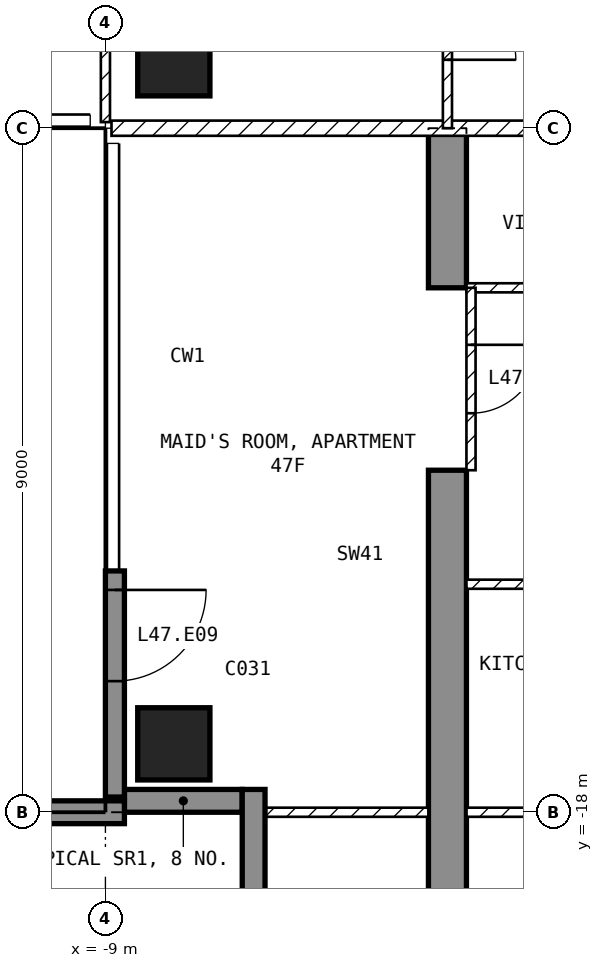
"""IFC4 building model, lengths in metres.
Left out: names, types, materials, properties, quantities, classifications, styles, units other than length and angle.
Written with IfcOpenShell. Run it as: python <this file> out.ifc"""

import sys

from ifc_helpers import new_model, si_unit, direction, frame, frame_2d, origin, origin_2d, place, context, subcontext, project, spatial, polyline, rectangle, outline, extrude, element, fill, save


model = new_model("IFC4")
c1 = context("Model", 3, precision=1e-05, world=origin(), true_north=direction((0.0, 1.0)))
c2 = subcontext(c1, "Body", "Model", "MODEL_VIEW")
j1 = project(units=[si_unit("LENGTHUNIT", "METRE"), si_unit("PLANEANGLEUNIT", "RADIAN")], contexts=[c1])
p1 = place(None, origin())
s1 = spatial("IfcSite", under=j1, at=p1, CompositionType="ELEMENT")
p2 = place(p1, origin())
s2 = spatial("IfcBuilding", under=s1, at=p2, CompositionType="ELEMENT")
p3 = place(p2, frame((0.0, 0.0, 191.1)))
s3 = spatial("IfcBuildingStorey", under=s2, at=p3, CompositionType="ELEMENT", Elevation=191.1)
for number, where, z_axis, x_axis in (
    (1, (-8.1, -17.1, -0.25), (0.0, 0.0, 1.0), (1.0, 0.0, 0.0)),
    (2, (-8.1, -8.1, -0.25), (0.0, 0.0, 1.0), (1.0, 0.0, 0.0)),
):
    element("IfcColumn", number, at=place(p3, frame(where, z_axis=z_axis, x_axis=x_axis)), inside=s3, PredefinedType="COLUMN", context=c2, shape_type="SweptSolid", body=[
        extrude(rectangle(XDim=0.95, YDim=0.95, at=origin_2d()), origin(), (0.0, 0.0, 1.0), 3.5),
    ])
p4 = place(p3, frame((-4.75, -20.225, -0.25), z_axis=(1.0, 0.0, 0.0), x_axis=(0.0, 1.0, 0.0)))
e3 = element("IfcWall", 3, at=p4, inside=s3, PredefinedType="SHEAR", context=c2, shape_type="SweptSolid", body=[
    extrude(outline(polyline([(0.0, 0.0), (6.725, 0.0), (6.725, 2.65), (9.125, 2.65), (9.125, 0.0), (11.225, 0.0), (11.225, 3.5), (0.0, 3.5), (0.0, 0.0)])), origin(), (0.0, 0.0, 1.0), 0.5),
])
p5 = place(p3, frame((-8.875, -14.825, 0.0), z_axis=(0.0, 0.0, 1.0), x_axis=(0.0, -1.0, 0.0)))
e4 = element("IfcWall", 4, at=p5, inside=s3, PredefinedType="SOLIDWALL", context=c2, shape_type="SweptSolid", body=[
    extrude(rectangle(XDim=2.975, YDim=0.25, at=frame_2d((1.488, 0.0))), origin(), (0.0, 0.0, 1.0), 3.25),
])
p6 = place(p5, frame((0.25, 0.0, 0.0)))
e5 = element("IfcOpeningElement", 5, at=p6, cuts=e4, PredefinedType="OPENING", context=c2, shape_type="SweptSolid", body=[
    extrude(rectangle(XDim=1.2, YDim=2.4, at=frame_2d((0.6, 1.2))), frame((0.0, 0.135, 0.0), z_axis=(0.0, -1.0, 0.0), x_axis=(1.0, 0.0, 0.0)), (0.0, 0.0, 1.0), 0.27),
])
p7 = place(p3, frame((-8.75, -17.85, 0.0), z_axis=(0.0, 0.0, 1.0), x_axis=(1.0, 0.0, 0.0)))
e6 = element("IfcWall", 6, at=p7, inside=s3, PredefinedType="SOLIDWALL", context=c2, shape_type="SweptSolid", body=[
    extrude(rectangle(XDim=1.55, YDim=0.3, at=frame_2d((0.775, 0.0))), origin(), (0.0, 0.0, 1.0), 3.25),
])
p8 = place(p3, frame((-7.05, -17.7, 0.0), z_axis=(0.0, 0.0, 1.0), x_axis=(0.0, -1.0, 0.0)))
e7 = element("IfcWall", 7, at=p8, inside=s3, PredefinedType="SOLIDWALL", context=c2, shape_type="SweptSolid", body=[
    extrude(rectangle(XDim=1.8, YDim=0.3, at=frame_2d((0.9, 0.0))), origin(), (0.0, 0.0, 1.0), 3.25),
])
p9 = place(p3, frame((-8.75, -18.0, 0.0), z_axis=(0.0, 0.0, 1.0), x_axis=(-1.0, 0.0, 0.0)))
e8 = element("IfcWall", 8, at=p9, inside=s3, PredefinedType="SOLIDWALL", context=c2, shape_type="SweptSolid", body=[
    extrude(rectangle(XDim=2.95, YDim=0.3, at=frame_2d((1.475, 0.0))), origin(), (0.0, 0.0, 1.0), 3.25),
])
p10 = place(p3, frame((8.92, -9.0, 0.0), z_axis=(0.0, 0.0, 1.0), x_axis=(-1.0, 0.0, 0.0)))
e9 = element("IfcWall", 9, at=p10, inside=s3, PredefinedType="PARTITIONING", context=c2, shape_type="SweptSolid", body=[
    extrude(rectangle(XDim=17.84, YDim=0.2, at=frame_2d((8.92, 0.0))), origin(), (0.0, 0.0, 1.0), 3.25),
])
p11 = place(p10, frame((8.42, 0.0, 0.0)))
e10 = element("IfcOpeningElement", 10, at=p11, cuts=e9, PredefinedType="OPENING", context=c2, shape_type="SweptSolid", body=[
    extrude(rectangle(XDim=1.0, YDim=2.1, at=frame_2d((0.5, 1.05))), frame((0.0, 0.11, 0.0), z_axis=(0.0, -1.0, 0.0), x_axis=(1.0, 0.0, 0.0)), (0.0, 0.0, 1.0), 0.22),
])
p12 = place(p3, frame((-9.0, -1.3, 0.0), z_axis=(0.0, 0.0, 1.0), x_axis=(0.0, -1.0, 0.0)))
e11 = element("IfcWall", 11, at=p12, inside=s3, PredefinedType="PARTITIONING", context=c2, shape_type="SweptSolid", body=[
    extrude(rectangle(XDim=7.62, YDim=0.12, at=frame_2d((3.81, 0.0))), origin(), (0.0, 0.0, 1.0), 3.25),
])
p13 = place(p12, frame((1.15, 0.0, 0.0)))
e12 = element("IfcOpeningElement", 12, at=p13, cuts=e11, PredefinedType="OPENING", context=c2, shape_type="SweptSolid", body=[
    extrude(rectangle(XDim=0.9, YDim=2.1, at=frame_2d((0.45, 1.05))), frame((0.0, 0.07, 0.0), z_axis=(0.0, -1.0, 0.0), x_axis=(1.0, 0.0, 0.0)), (0.0, 0.0, 1.0), 0.14),
])
p14 = place(p3, frame((-4.5, -6.3, 0.0), z_axis=(0.0, 0.0, 1.0), x_axis=(0.0, -1.0, 0.0)))
e13 = element("IfcWall", 13, at=p14, inside=s3, PredefinedType="PARTITIONING", context=c2, shape_type="SweptSolid", body=[
    extrude(rectangle(XDim=2.7, YDim=0.12, at=frame_2d((1.35, 0.0))), origin(), (0.0, 0.0, 1.0), 3.25),
])
p15 = place(p14, frame((0.9, 0.0, 0.0)))
e14 = element("IfcOpeningElement", 14, at=p15, cuts=e13, PredefinedType="OPENING", context=c2, shape_type="SweptSolid", body=[
    extrude(rectangle(XDim=0.9, YDim=2.1, at=frame_2d((0.45, 1.05))), frame((0.0, 0.07, 0.0), z_axis=(0.0, -1.0, 0.0), x_axis=(1.0, 0.0, 0.0)), (0.0, 0.0, 1.0), 0.14),
])
p16 = place(p3, frame((2.1, -11.1, 0.0), z_axis=(0.0, 0.0, 1.0), x_axis=(-1.0, 0.0, 0.0)))
e15 = element("IfcWall", 15, at=p16, inside=s3, PredefinedType="PARTITIONING", context=c2, shape_type="SweptSolid", body=[
    extrude(rectangle(XDim=6.35, YDim=0.12, at=frame_2d((3.175, 0.0))), origin(), (0.0, 0.0, 1.0), 3.25),
])
p17 = place(p16, frame((2.725, 0.0, 0.0)))
e16 = element("IfcOpeningElement", 16, at=p17, cuts=e15, PredefinedType="OPENING", context=c2, shape_type="SweptSolid", body=[
    extrude(rectangle(XDim=0.9, YDim=2.1, at=frame_2d((0.45, 1.05))), frame((0.0, 0.07, 0.0), z_axis=(0.0, -1.0, 0.0), x_axis=(1.0, 0.0, 0.0)), (0.0, 0.0, 1.0), 0.14),
])
p18 = place(p3, frame((-0.44, -15.0, 0.0), z_axis=(0.0, 0.0, 1.0), x_axis=(-1.0, 0.0, 0.0)))
e17 = element("IfcWall", 17, at=p18, inside=s3, PredefinedType="PARTITIONING", context=c2, shape_type="SweptSolid", body=[
    extrude(rectangle(XDim=3.81, YDim=0.12, at=frame_2d((1.905, 0.0))), origin(), (0.0, 0.0, 1.0), 3.25),
])
p19 = place(p3, frame((4.25, -18.0, 0.0), z_axis=(0.0, 0.0, 1.0), x_axis=(-1.0, 0.0, 0.0)))
e18 = element("IfcWall", 18, at=p19, inside=s3, PredefinedType="PARTITIONING", context=c2, shape_type="SweptSolid", body=[
    extrude(rectangle(XDim=8.5, YDim=0.12, at=frame_2d((4.25, 0.0))), origin(), (0.0, 0.0, 1.0), 3.25),
])
p20 = place(p19, frame((1.925, 0.0, 0.0)))
e19 = element("IfcOpeningElement", 19, at=p20, cuts=e18, PredefinedType="OPENING", context=c2, shape_type="SweptSolid", body=[
    extrude(rectangle(XDim=0.9, YDim=2.1, at=frame_2d((0.45, 1.05))), frame((0.0, 0.07, 0.0), z_axis=(0.0, -1.0, 0.0), x_axis=(1.0, 0.0, 0.0)), (0.0, 0.0, 1.0), 0.14),
])
p21 = place(p3, frame((-4.75, -18.0, 0.0), z_axis=(0.0, 0.0, 1.0), x_axis=(-1.0, 0.0, 0.0)))
e20 = element("IfcWall", 20, at=p21, inside=s3, PredefinedType="PARTITIONING", context=c2, shape_type="SweptSolid", body=[
    extrude(rectangle(XDim=2.37, YDim=0.12, at=frame_2d((1.185, 0.0))), origin(), (0.0, 0.0, 1.0), 3.25),
])
p22 = place(p3, frame((-4.19, -11.1, 0.0), z_axis=(0.0, 0.0, 1.0), x_axis=(0.0, -1.0, 0.0)))
e21 = element("IfcWall", 21, at=p22, inside=s3, PredefinedType="PARTITIONING", context=c2, shape_type="SweptSolid", body=[
    extrude(rectangle(XDim=2.4, YDim=0.12, at=frame_2d((1.2, 0.0))), origin(), (0.0, 0.0, 1.0), 2.4),
])
p23 = place(p22, frame((0.75, 0.0, 0.0)))
e22 = element("IfcOpeningElement", 22, at=p23, cuts=e21, PredefinedType="OPENING", context=c2, shape_type="SweptSolid", body=[
    extrude(rectangle(XDim=0.9, YDim=2.1, at=frame_2d((0.45, 1.05))), frame((0.0, 0.07, 0.0), z_axis=(0.0, -1.0, 0.0), x_axis=(1.0, 0.0, 0.0)), (0.0, 0.0, 1.0), 0.14),
])
p24 = place(p6, origin())
e23 = element("IfcDoor", 23, at=p24, inside=s3, OperationType="SINGLE_SWING_LEFT", PredefinedType="DOOR", context=c2, shape_type="SweptSolid", body=[
    extrude(rectangle(XDim=1.2, YDim=2.4, at=frame_2d((0.6, 1.2))), frame((0.0, 0.025, 0.0), z_axis=(0.0, -1.0, 0.0), x_axis=(1.0, 0.0, 0.0)), (0.0, 0.0, 1.0), 0.05),
])
fill(e5, e23)
p25 = place(p15, origin())
e24 = element("IfcDoor", 24, at=p25, inside=s3, OperationType="SINGLE_SWING_RIGHT", PredefinedType="DOOR", context=c2, shape_type="SweptSolid", body=[
    extrude(rectangle(XDim=0.9, YDim=2.1, at=frame_2d((0.45, 1.05))), frame((0.0, 0.025, 0.0), z_axis=(0.0, -1.0, 0.0), x_axis=(1.0, 0.0, 0.0)), (0.0, 0.0, 1.0), 0.05),
])
fill(e14, e24)
p26 = place(p23, origin())
e25 = element("IfcDoor", 25, at=p26, inside=s3, OperationType="SINGLE_SWING_LEFT", PredefinedType="DOOR", context=c2, shape_type="SweptSolid", body=[
    extrude(rectangle(XDim=0.9, YDim=2.1, at=frame_2d((0.45, 1.05))), frame((0.0, 0.025, 0.0), z_axis=(0.0, -1.0, 0.0), x_axis=(1.0, 0.0, 0.0)), (0.0, 0.0, 1.0), 0.05),
])
fill(e22, e25)
save(model, sys.argv[1])
